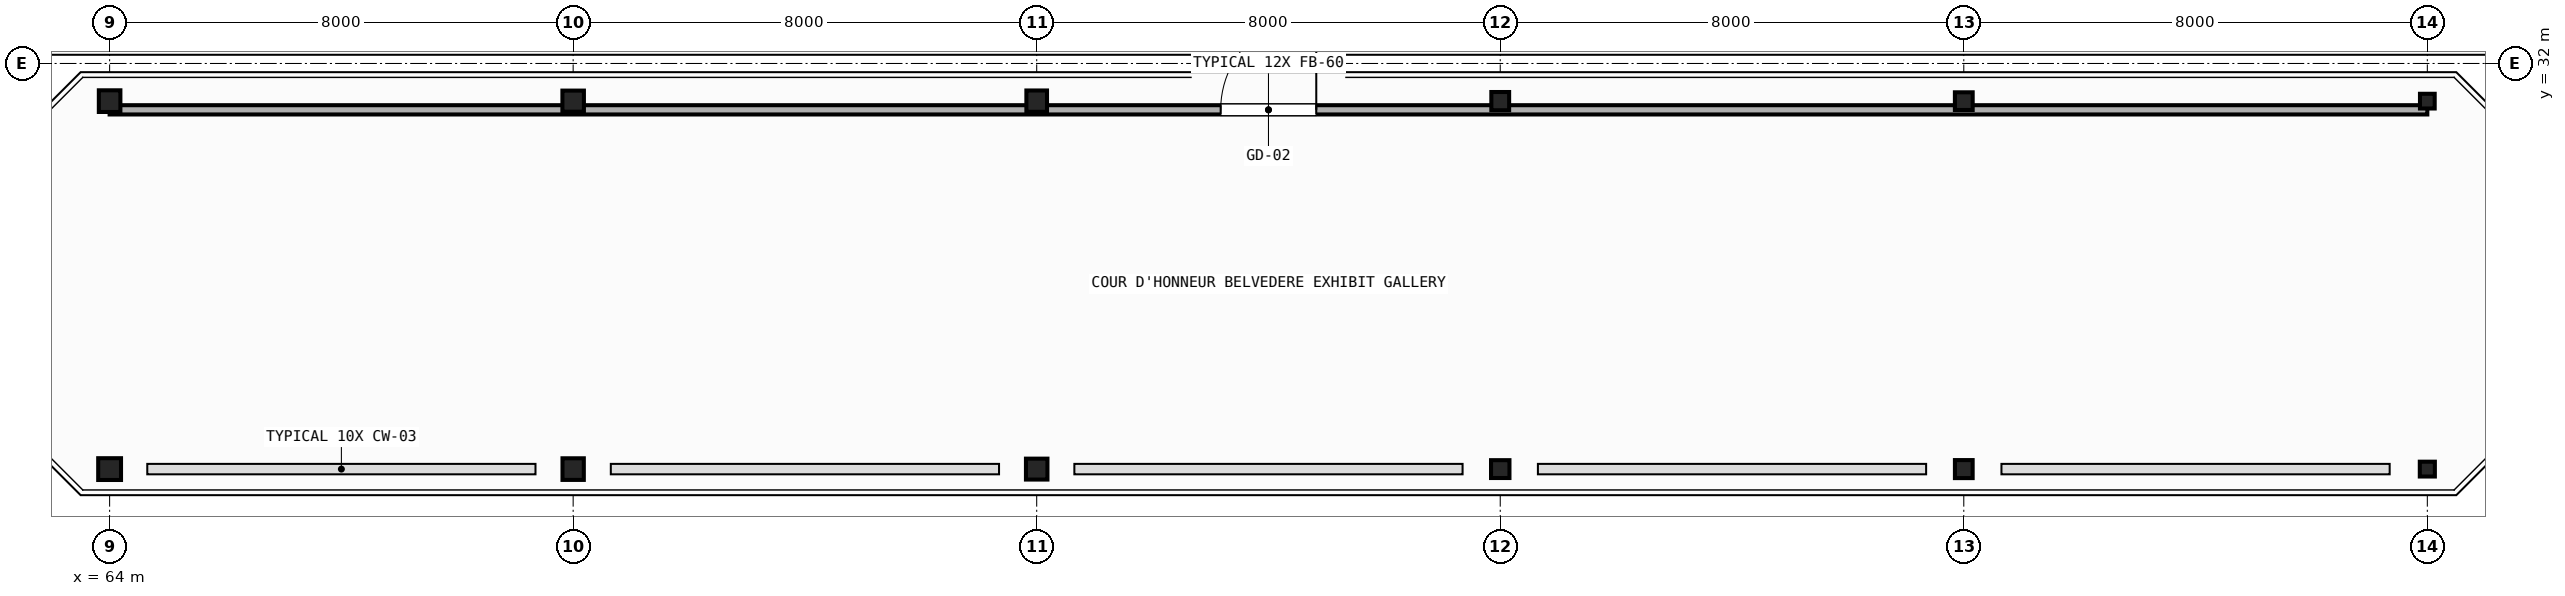
"""IFC4 building model, lengths in metres.
Left out: names, types, materials, properties, quantities, classifications, styles, units other than length and angle.
Written with IfcOpenShell. Run it as: python <this file> out.ifc"""

import sys

from ifc_helpers import new_model, si_unit, direction, frame, frame_2d, origin, origin_2d, place, context, subcontext, project, spatial, rectangle, i_section, extrude, element, fill, save


model = new_model("IFC4")
c1 = context("Model", 3, precision=1e-05, world=origin(), true_north=direction((0.0, 1.0)))
c2 = subcontext(c1, "Body", "Model", "MODEL_VIEW")
j1 = project(units=[si_unit("LENGTHUNIT", "METRE"), si_unit("PLANEANGLEUNIT", "RADIAN")], contexts=[c1])
p1 = place(None, origin())
s1 = spatial("IfcSite", under=j1, at=p1, CompositionType="ELEMENT")
p2 = place(p1, origin())
s2 = spatial("IfcBuilding", under=s1, at=p2, CompositionType="ELEMENT")
p3 = place(p2, frame((0.0, 0.0, 5.4)))
s3 = spatial("IfcBuildingStorey", under=s2, at=p3, CompositionType="ELEMENT", Elevation=5.4)
p4 = place(p3, frame((64.0, 25.0, 0.0), z_axis=(0.0, 0.0, 1.0), x_axis=(1.0, 0.0, 0.0)))
e1 = element("IfcColumn", 1, at=p4, inside=s3, PredefinedType="COLUMN", context=c2, shape_type="SweptSolid", body=[
    extrude(i_section(OverallWidth=0.394, OverallDepth=0.376, WebThickness=0.017, FlangeThickness=0.028, FilletRadius=0.015, at=origin_2d()), origin(), (0.0, 0.0, 1.0), 4.8),
])
p5 = place(p3, frame((64.0, 31.35, 0.0), z_axis=(0.0, 0.0, 1.0), x_axis=(0.0, 1.0, 0.0)))
e2 = element("IfcColumn", 2, at=p5, inside=s3, PredefinedType="COLUMN", context=c2, shape_type="SweptSolid", body=[
    extrude(i_section(OverallWidth=0.374, OverallDepth=0.372, WebThickness=0.016, FlangeThickness=0.026, FilletRadius=0.015, at=origin_2d()), origin(), (0.0, 0.0, 1.0), 4.8),
])
p6 = place(p3, frame((72.0, 25.0, 0.0), z_axis=(0.0, 0.0, 1.0), x_axis=(0.0, 1.0, 0.0)))
e3 = element("IfcColumn", 3, at=p6, inside=s3, PredefinedType="COLUMN", context=c2, shape_type="SweptSolid", body=[
    extrude(i_section(OverallWidth=0.373, OverallDepth=0.368, WebThickness=0.015, FlangeThickness=0.024, FilletRadius=0.015, at=origin_2d()), origin(), (0.0, 0.0, 1.0), 4.8),
])
p7 = place(p3, frame((72.0, 31.35, 0.0), z_axis=(0.0, 0.0, 1.0), x_axis=(1.0, 0.0, 0.0)))
e4 = element("IfcColumn", 4, at=p7, inside=s3, PredefinedType="COLUMN", context=c2, shape_type="SweptSolid", body=[
    extrude(i_section(OverallWidth=0.371, OverallDepth=0.364, WebThickness=0.013, FlangeThickness=0.022, FilletRadius=0.015, at=origin_2d()), origin(), (0.0, 0.0, 1.0), 4.8),
])
p8 = place(p3, frame((80.0, 25.0, 0.0), z_axis=(0.0, 0.0, 1.0), x_axis=(1.0, 0.0, 0.0)))
e5 = element("IfcColumn", 5, at=p8, inside=s3, PredefinedType="COLUMN", context=c2, shape_type="SweptSolid", body=[
    extrude(i_section(OverallWidth=0.371, OverallDepth=0.361, WebThickness=0.012, FlangeThickness=0.02, FilletRadius=0.015, at=origin_2d()), origin(), (0.0, 0.0, 1.0), 4.8),
])
p9 = place(p3, frame((80.0, 31.35, 0.0), z_axis=(0.0, 0.0, 1.0), x_axis=(0.0, 1.0, 0.0)))
e6 = element("IfcColumn", 6, at=p9, inside=s3, PredefinedType="COLUMN", context=c2, shape_type="SweptSolid", body=[
    extrude(i_section(OverallWidth=0.368, OverallDepth=0.356, WebThickness=0.011, FlangeThickness=0.018, FilletRadius=0.015, at=origin_2d()), origin(), (0.0, 0.0, 1.0), 4.8),
])
p10 = place(p3, frame((88.0, 25.0, 0.0), z_axis=(0.0, 0.0, 1.0), x_axis=(0.0, 1.0, 0.0)))
e7 = element("IfcColumn", 7, at=p10, inside=s3, PredefinedType="COLUMN", context=c2, shape_type="SweptSolid", body=[
    extrude(i_section(OverallWidth=0.308, OverallDepth=0.318, WebThickness=0.013, FlangeThickness=0.021, FilletRadius=0.013, at=origin_2d()), origin(), (0.0, 0.0, 1.0), 4.8),
])
p11 = place(p3, frame((88.0, 31.35, 0.0), z_axis=(0.0, 0.0, 1.0), x_axis=(1.0, 0.0, 0.0)))
e8 = element("IfcColumn", 8, at=p11, inside=s3, PredefinedType="COLUMN", context=c2, shape_type="SweptSolid", body=[
    extrude(i_section(OverallWidth=0.307, OverallDepth=0.315, WebThickness=0.012, FlangeThickness=0.019, FilletRadius=0.013, at=origin_2d()), origin(), (0.0, 0.0, 1.0), 4.8),
])
p12 = place(p3, frame((96.0, 25.0, 0.0), z_axis=(0.0, 0.0, 1.0), x_axis=(1.0, 0.0, 0.0)))
e9 = element("IfcColumn", 9, at=p12, inside=s3, PredefinedType="COLUMN", context=c2, shape_type="SweptSolid", body=[
    extrude(i_section(OverallWidth=0.306, OverallDepth=0.311, WebThickness=0.011, FlangeThickness=0.017, FilletRadius=0.013, at=origin_2d()), origin(), (0.0, 0.0, 1.0), 4.8),
])
p13 = place(p3, frame((96.0, 31.35, 0.0), z_axis=(0.0, 0.0, 1.0), x_axis=(0.0, 1.0, 0.0)))
e10 = element("IfcColumn", 10, at=p13, inside=s3, PredefinedType="COLUMN", context=c2, shape_type="SweptSolid", body=[
    extrude(i_section(OverallWidth=0.305, OverallDepth=0.307, WebThickness=0.01, FlangeThickness=0.015, FilletRadius=0.013, at=origin_2d()), origin(), (0.0, 0.0, 1.0), 4.8),
])
p14 = place(p3, frame((104.0, 25.0, 0.0), z_axis=(0.0, 0.0, 1.0), x_axis=(0.0, 1.0, 0.0)))
e11 = element("IfcColumn", 11, at=p14, inside=s3, PredefinedType="COLUMN", context=c2, shape_type="SweptSolid", body=[
    extrude(i_section(OverallWidth=0.256, OverallDepth=0.26, WebThickness=0.011, FlangeThickness=0.017, FilletRadius=0.011, at=origin_2d()), origin(), (0.0, 0.0, 1.0), 4.8),
])
p15 = place(p3, frame((104.0, 31.35, 0.0), z_axis=(0.0, 0.0, 1.0), x_axis=(1.0, 0.0, 0.0)))
e12 = element("IfcColumn", 12, at=p15, inside=s3, PredefinedType="COLUMN", context=c2, shape_type="SweptSolid", body=[
    extrude(i_section(OverallWidth=0.254, OverallDepth=0.254, WebThickness=0.009, FlangeThickness=0.014, FilletRadius=0.011, at=origin_2d()), origin(), (0.0, 0.0, 1.0), 4.8),
])
p16 = place(p3, frame((64.0, 31.2, 0.0), z_axis=(0.0, 0.0, 1.0), x_axis=(1.0, 0.0, 0.0)))
e13 = element("IfcWall", 13, at=p16, inside=s3, PredefinedType="PARTITIONING", context=c2, shape_type="SweptSolid", body=[
    extrude(rectangle(XDim=40.0, YDim=0.16, at=frame_2d((20.0, 0.0))), origin(), (0.0, 0.0, 1.0), 4.047),
])
p17 = place(p16, frame((19.175, 0.0, 0.0)))
e14 = element("IfcOpeningElement", 14, at=p17, cuts=e13, PredefinedType="OPENING", context=c2, shape_type="SweptSolid", body=[
    extrude(rectangle(XDim=1.65, YDim=2.35, at=frame_2d((0.825, 1.175))), frame((0.0, 0.09, 0.0), z_axis=(0.0, -1.0, 0.0), x_axis=(1.0, 0.0, 0.0)), (0.0, 0.0, 1.0), 0.18),
])
p18 = place(p17, origin())
e15 = element("IfcDoor", 15, at=p18, inside=s3, OperationType="SINGLE_SWING_RIGHT", PredefinedType="DOOR", context=c2, shape_type="SweptSolid", body=[
    extrude(rectangle(XDim=1.65, YDim=2.35, at=frame_2d((0.825, 1.175))), frame((0.0, 0.025, 0.0), z_axis=(0.0, -1.0, 0.0), x_axis=(1.0, 0.0, 0.0)), (0.0, 0.0, 1.0), 0.05),
])
fill(e14, e15)
save(model, sys.argv[1])
